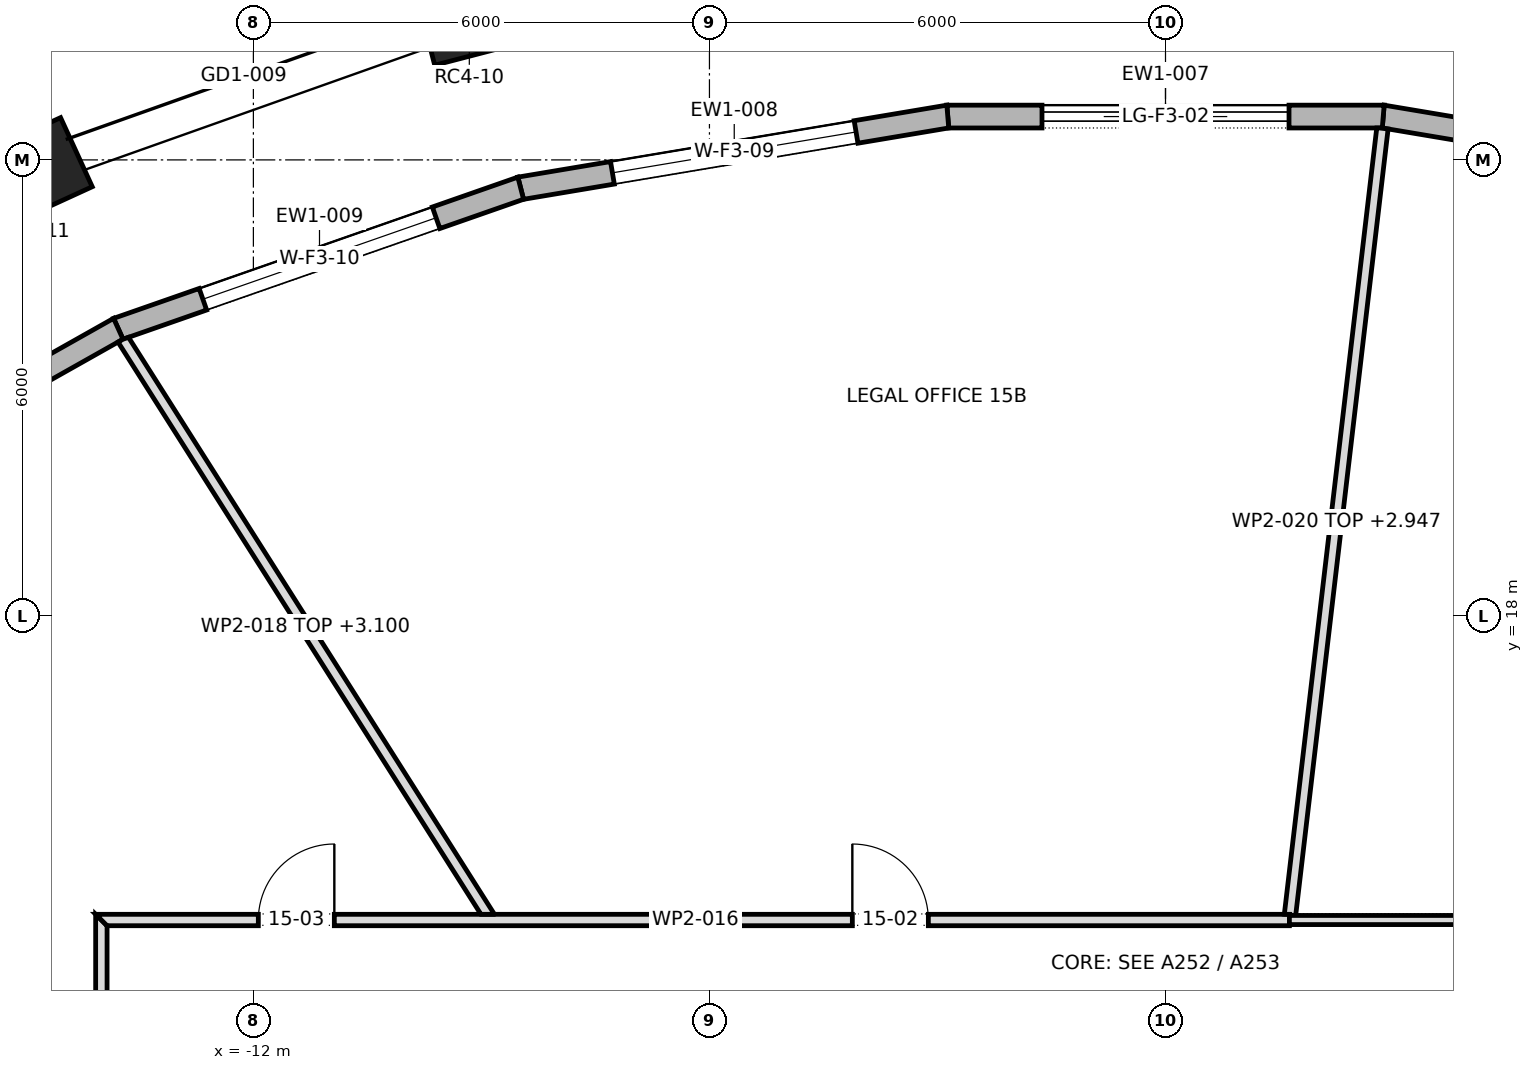
"""IFC4 building model, lengths in metres.
Left out: names, types, materials, properties, quantities, classifications, styles, units other than length and angle.
Written with IfcOpenShell. Run it as: python <this file> out.ifc"""

import sys

from ifc_helpers import new_model, si_unit, direction, frame, frame_2d, origin, origin_2d, place, context, subcontext, project, spatial, polyline, rectangle, outline, extrude, element, fill, save


model = new_model("IFC4")
c1 = context("Model", 3, precision=1e-05, world=origin(), true_north=direction((0.0, 1.0)))
c2 = subcontext(c1, "Body", "Model", "MODEL_VIEW")
j1 = project(units=[si_unit("LENGTHUNIT", "METRE"), si_unit("PLANEANGLEUNIT", "RADIAN")], contexts=[c1])
p1 = place(None, origin())
s1 = spatial("IfcSite", under=j1, at=p1, CompositionType="ELEMENT")
p2 = place(p1, origin())
s2 = spatial("IfcBuilding", under=s1, at=p2, CompositionType="ELEMENT")
p3 = place(p2, frame((0.0, 0.0, 222.9)))
s3 = spatial("IfcBuildingStorey", under=s2, at=p3, CompositionType="ELEMENT", Elevation=222.9)
for number, where, z_axis, x_axis in (
    (1, (-9.159, 25.881, 0.0), (0.0, 0.0, 1.0), (-0.968, -0.252, 0.0)),
    (2, (-14.874, 23.852, 0.0), (0.0, 0.0, 1.0), (-0.909, -0.417, 0.0)),
):
    element("IfcColumn", number, at=place(p3, frame(where, z_axis=z_axis, x_axis=x_axis)), inside=s3, PredefinedType="COLUMN", context=c2, shape_type="SweptSolid", body=[
        extrude(rectangle(XDim=1.2, YDim=1.0, at=origin_2d()), origin(), (0.0, 0.0, 1.0), 4.0),
    ])
p4 = place(p3, frame((8.483, 23.627, 0.0), z_axis=(0.0, 0.0, 1.0), x_axis=(-0.986218486863, 0.16544816762, 0.0)))
e3 = element("IfcWall", 3, at=p4, inside=s3, PredefinedType="STANDARD", context=c2, shape_type="SweptSolid", body=[
    extrude(outline(polyline([(-0.013, -0.15), (5.71, -0.15), (5.685, 0.15), (0.013, 0.15), (-0.013, -0.15)])), origin(), (0.0, 0.0, 1.0), 3.7),
])
p5 = place(p4, frame((1.224, 0.0, 0.6)))
e4 = element("IfcOpeningElement", 4, at=p5, cuts=e3, PredefinedType="OPENING", context=c2, shape_type="SweptSolid", body=[
    extrude(rectangle(XDim=3.25, YDim=2.65, at=frame_2d((1.625, 1.325))), frame((0.0, 0.162, 0.0), z_axis=(0.0, -1.0, 0.0), x_axis=(1.0, 0.0, 0.0)), (0.0, 0.0, 1.0), 0.324),
])
p6 = place(p3, frame((2.864, 24.57, 0.0), z_axis=(0.0, 0.0, 1.0), x_axis=(-1.0, 0.0, 0.0)))
e5 = element("IfcWall", 5, at=p6, inside=s3, PredefinedType="STANDARD", context=c2, shape_type="SweptSolid", body=[
    extrude(outline(polyline([(-0.012, -0.15), (5.741, -0.15), (5.716, 0.15), (0.012, 0.15), (-0.012, -0.15)])), origin(), (0.0, 0.0, 1.0), 3.7),
])
p7 = place(p6, frame((1.239, 0.0, 0.0)))
e6 = element("IfcOpeningElement", 6, at=p7, cuts=e5, PredefinedType="OPENING", context=c2, shape_type="SweptSolid", body=[
    extrude(rectangle(XDim=3.25, YDim=3.25, at=frame_2d((1.625, 1.625))), frame((0.0, 0.162, 0.0), z_axis=(0.0, -1.0, 0.0), x_axis=(1.0, 0.0, 0.0)), (0.0, 0.0, 1.0), 0.324),
])
p8 = place(p3, frame((-2.864, 24.57, 0.0), z_axis=(0.0, 0.0, 1.0), x_axis=(-0.986218486863, -0.16544816762, 0.0)))
e7 = element("IfcWall", 7, at=p8, inside=s3, PredefinedType="STANDARD", context=c2, shape_type="SweptSolid", body=[
    extrude(outline(polyline([(-0.012, -0.15), (5.71, -0.15), (5.685, 0.15), (0.012, 0.15), (-0.012, -0.15)])), origin(), (0.0, 0.0, 1.0), 3.7),
])
p9 = place(p8, frame((1.224, 0.0, 0.6)))
e8 = element("IfcOpeningElement", 8, at=p9, cuts=e7, PredefinedType="OPENING", context=c2, shape_type="SweptSolid", body=[
    extrude(rectangle(XDim=3.25, YDim=2.65, at=frame_2d((1.625, 1.325))), frame((0.0, 0.162, 0.0), z_axis=(0.0, -1.0, 0.0), x_axis=(1.0, 0.0, 0.0)), (0.0, 0.0, 1.0), 0.324),
])
p10 = place(p3, frame((-8.483, 23.627, 0.0), z_axis=(0.0, 0.0, 1.0), x_axis=(-0.944053670735, -0.329791853708, 0.0)))
e9 = element("IfcWall", 9, at=p10, inside=s3, PredefinedType="STANDARD", context=c2, shape_type="SweptSolid", body=[
    extrude(outline(polyline([(-0.013, -0.15), (5.621, -0.15), (5.594, 0.15), (0.013, 0.15), (-0.013, -0.15)])), origin(), (0.0, 0.0, 1.0), 3.7),
])
p11 = place(p10, frame((1.179, 0.0, 0.6)))
e10 = element("IfcOpeningElement", 10, at=p11, cuts=e9, PredefinedType="OPENING", context=c2, shape_type="SweptSolid", body=[
    extrude(rectangle(XDim=3.25, YDim=2.65, at=frame_2d((1.625, 1.325))), frame((0.0, 0.162, 0.0), z_axis=(0.0, -1.0, 0.0), x_axis=(1.0, 0.0, 0.0)), (0.0, 0.0, 1.0), 0.324),
])
p12 = place(p3, frame((-13.777, 21.778, 0.0), z_axis=(0.0, 0.0, 1.0), x_axis=(-0.871207038577, -0.490915772749, 0.0)))
e11 = element("IfcWall", 11, at=p12, inside=s3, PredefinedType="STANDARD", context=c2, shape_type="SweptSolid", body=[
    extrude(outline(polyline([(-0.013, -0.15), (5.485, -0.15), (5.457, 0.15), (0.013, 0.15), (-0.013, -0.15)])), origin(), (0.0, 0.0, 1.0), 3.7),
])
p13 = place(p12, frame((1.111, 0.0, 0.6)))
e12 = element("IfcOpeningElement", 12, at=p13, cuts=e11, PredefinedType="OPENING", context=c2, shape_type="SweptSolid", body=[
    extrude(rectangle(XDim=3.25, YDim=2.65, at=frame_2d((1.625, 1.325))), frame((0.0, 0.162, 0.0), z_axis=(0.0, -1.0, 0.0), x_axis=(1.0, 0.0, 0.0)), (0.0, 0.0, 1.0), 0.324),
])
p14 = place(p3, frame((-22.494, 15.57, 0.0), z_axis=(0.0, 0.0, 1.0), x_axis=(0.822227997751, -0.569158255421, 0.0)))
e13 = element("IfcWall", 13, at=p14, inside=s3, PredefinedType="PARTITIONING", context=c2, shape_type="SweptSolid", body=[
    extrude(outline(polyline([(0.0, -0.075), (1.858, -0.075), (3.717, -0.075), (5.575, -0.075), (5.577, -0.073), (5.578, -0.075), (7.155, -0.075), (8.732, -0.075), (10.309, -0.075), (10.309, -0.075), (10.281, -0.034), (10.269, -0.043), (10.24, -0.002), (10.24, -0.002), (10.187, 0.075), (8.493, 0.075), (6.8, 0.075), (5.106, 0.075), (3.412, 0.075), (1.719, 0.075), (0.025, 0.075), (0.004, -0.0), (0.0, -0.066), (0.0, -0.075)])), origin(), (0.0, 0.0, 1.0), 2.947),
])
p15 = place(p3, frame((-14.0, 9.69, 0.0), z_axis=(0.0, 0.0, 1.0), x_axis=(0.0, 1.0, 0.0)))
e14 = element("IfcWall", 14, at=p15, inside=s3, PredefinedType="PARTITIONING", context=c2, shape_type="SweptSolid", body=[
    extrude(outline(polyline([(0.0, -0.075), (1.412, -0.075), (2.823, -0.075), (4.235, -0.075), (4.385, 0.075), (2.923, 0.075), (1.462, 0.075), (0.0, 0.075), (0.0, -0.075)])), origin(), (0.0, 0.0, 1.0), 3.7),
])
p16 = place(p3, frame((-14.075, 14.0, 0.0), z_axis=(0.0, 0.0, 1.0), x_axis=(1.0, 0.0, 0.0)))
e15 = element("IfcWall", 15, at=p16, inside=s3, PredefinedType="PARTITIONING", context=c2, shape_type="SweptSolid", body=[
    extrude(outline(polyline([(15.705, 0.075), (13.742, 0.075), (11.779, 0.075), (9.815, 0.075), (7.853, 0.075), (5.889, 0.075), (3.926, 0.075), (1.963, 0.075), (0.0, 0.075), (0.15, -0.075), (2.094, -0.075), (4.039, -0.075), (5.983, -0.075), (7.927, -0.075), (9.872, -0.075), (11.816, -0.075), (13.76, -0.075), (15.705, -0.075), (15.705, 0.075)])), origin(), (0.0, 0.0, 1.0), 3.7),
])
p17 = place(p16, frame((9.955, 0.0, 0.0)))
e16 = element("IfcOpeningElement", 16, at=p17, cuts=e15, PredefinedType="OPENING", context=c2, shape_type="SweptSolid", body=[
    extrude(rectangle(XDim=1.0, YDim=2.1, at=frame_2d((0.5, 1.05))), frame((0.0, 0.087, 0.0), z_axis=(0.0, -1.0, 0.0), x_axis=(1.0, 0.0, 0.0)), (0.0, 0.0, 1.0), 0.174),
])
p18 = place(p16, frame((2.14, 0.0, 0.0)))
e17 = element("IfcOpeningElement", 17, at=p18, cuts=e15, PredefinedType="OPENING", context=c2, shape_type="SweptSolid", body=[
    extrude(rectangle(XDim=1.0, YDim=2.1, at=frame_2d((0.5, 1.05))), frame((0.0, 0.087, 0.0), z_axis=(0.0, -1.0, 0.0), x_axis=(1.0, 0.0, 0.0)), (0.0, 0.0, 1.0), 0.174),
])
p19 = place(p3, frame((-8.892, 14.035, 0.0), z_axis=(0.0, 0.0, 1.0), x_axis=(-0.535558051622, 0.84449841524, 0.0)))
e18 = element("IfcWall", 18, at=p19, inside=s3, PredefinedType="PARTITIONING", context=c2, shape_type="SweptSolid", body=[
    extrude(outline(polyline([(0.0, -0.075), (1.798, -0.075), (3.595, -0.075), (5.393, -0.075), (7.191, -0.075), (8.989, -0.075), (9.006, -0.0), (9.01, 0.069), (9.01, 0.075), (7.227, 0.075), (5.444, 0.075), (3.661, 0.075), (1.878, 0.075), (0.095, 0.075), (0.0, -0.075), (0.0, -0.075)])), origin(), (0.0, 0.0, 1.0), 3.1),
])
p20 = place(p3, frame((1.638, 14.066, 0.0), z_axis=(0.0, 0.0, 1.0), x_axis=(0.116747450487, 0.993161634783, 0.0)))
e19 = element("IfcWall", 19, at=p20, inside=s3, PredefinedType="PARTITIONING", context=c2, shape_type="SweptSolid", body=[
    extrude(outline(polyline([(10.42, -0.075), (10.42, 0.039), (10.416, 0.075), (8.68, 0.075), (6.944, 0.075), (5.208, 0.075), (3.472, 0.075), (1.736, 0.075), (0.0, 0.075), (0.0, 0.074), (0.008, 0.009), (0.0, 0.008), (0.0, -0.055), (0.002, -0.075), (1.739, -0.075), (3.475, -0.075), (5.211, -0.075), (6.948, -0.075), (8.684, -0.075), (10.42, -0.075)])), origin(), (0.0, 0.0, 1.0), 2.947),
])
p21 = place(p3, frame((1.63, 14.0, 0.0), z_axis=(0.0, 0.0, 1.0), x_axis=(1.0, 0.0, 0.0)))
e20 = element("IfcWall", 20, at=p21, inside=s3, PredefinedType="PARTITIONING", context=c2, shape_type="SweptSolid", body=[
    extrude(outline(polyline([(12.015, -0.06), (12.015, -0.06), (11.965, 0.06), (9.971, 0.06), (7.977, 0.06), (5.982, 0.06), (3.988, 0.06), (1.994, 0.06), (0.0, 0.06), (0.0, -0.06), (1.717, -0.06), (3.433, -0.06), (5.149, -0.06), (6.866, -0.06), (8.583, -0.06), (10.299, -0.06), (12.015, -0.06)])), origin(), (0.0, 0.0, 1.0), 3.7),
])
p22 = place(p21, frame((5.495, 0.0, 0.0)))
e21 = element("IfcOpeningElement", 21, at=p22, cuts=e20, PredefinedType="OPENING", context=c2, shape_type="SweptSolid", body=[
    extrude(rectangle(XDim=1.0, YDim=2.1, at=frame_2d((0.5, 1.05))), frame((0.0, 0.072, 0.0), z_axis=(0.0, -1.0, 0.0), x_axis=(1.0, 0.0, 0.0)), (0.0, 0.0, 1.0), 0.144),
])
p23 = place(p7, origin())
e22 = element("IfcDoor", 22, at=p23, inside=s3, OperationType="DOUBLE_DOOR_SLIDING", PredefinedType="DOOR", context=c2, shape_type="SweptSolid", body=[
    extrude(rectangle(XDim=3.25, YDim=3.25, at=frame_2d((1.625, 1.625))), frame((0.0, 0.025, 0.0), z_axis=(0.0, -1.0, 0.0), x_axis=(1.0, 0.0, 0.0)), (0.0, 0.0, 1.0), 0.05),
])
fill(e6, e22)
p24 = place(p9, origin())
e23 = element("IfcWindow", 23, at=p24, inside=s3, PartitioningType="TRIPLE_PANEL_VERTICAL", PredefinedType="WINDOW", context=c2, shape_type="SweptSolid", body=[
    extrude(rectangle(XDim=3.25, YDim=2.65, at=frame_2d((1.625, 1.325))), frame((0.0, 0.03, 0.0), z_axis=(0.0, -1.0, 0.0), x_axis=(1.0, 0.0, 0.0)), (0.0, 0.0, 1.0), 0.06),
])
fill(e8, e23)
p25 = place(p11, origin())
e24 = element("IfcWindow", 24, at=p25, inside=s3, PartitioningType="TRIPLE_PANEL_VERTICAL", PredefinedType="WINDOW", context=c2, shape_type="SweptSolid", body=[
    extrude(rectangle(XDim=3.25, YDim=2.65, at=frame_2d((1.625, 1.325))), frame((0.0, 0.03, 0.0), z_axis=(0.0, -1.0, 0.0), x_axis=(1.0, 0.0, 0.0)), (0.0, 0.0, 1.0), 0.06),
])
fill(e10, e24)
p26 = place(p17, origin())
e25 = element("IfcDoor", 25, at=p26, inside=s3, OperationType="SINGLE_SWING_RIGHT", PredefinedType="DOOR", context=c2, shape_type="SweptSolid", body=[
    extrude(rectangle(XDim=1.0, YDim=2.1, at=frame_2d((0.5, 1.05))), frame((0.0, 0.025, 0.0), z_axis=(0.0, -1.0, 0.0), x_axis=(1.0, 0.0, 0.0)), (0.0, 0.0, 1.0), 0.05),
])
fill(e16, e25)
p27 = place(p18, origin())
e26 = element("IfcDoor", 26, at=p27, inside=s3, OperationType="SINGLE_SWING_LEFT", PredefinedType="DOOR", context=c2, shape_type="SweptSolid", body=[
    extrude(rectangle(XDim=1.0, YDim=2.1, at=frame_2d((0.5, 1.05))), frame((0.0, 0.025, 0.0), z_axis=(0.0, -1.0, 0.0), x_axis=(1.0, 0.0, 0.0)), (0.0, 0.0, 1.0), 0.05),
])
fill(e17, e26)
save(model, sys.argv[1])
